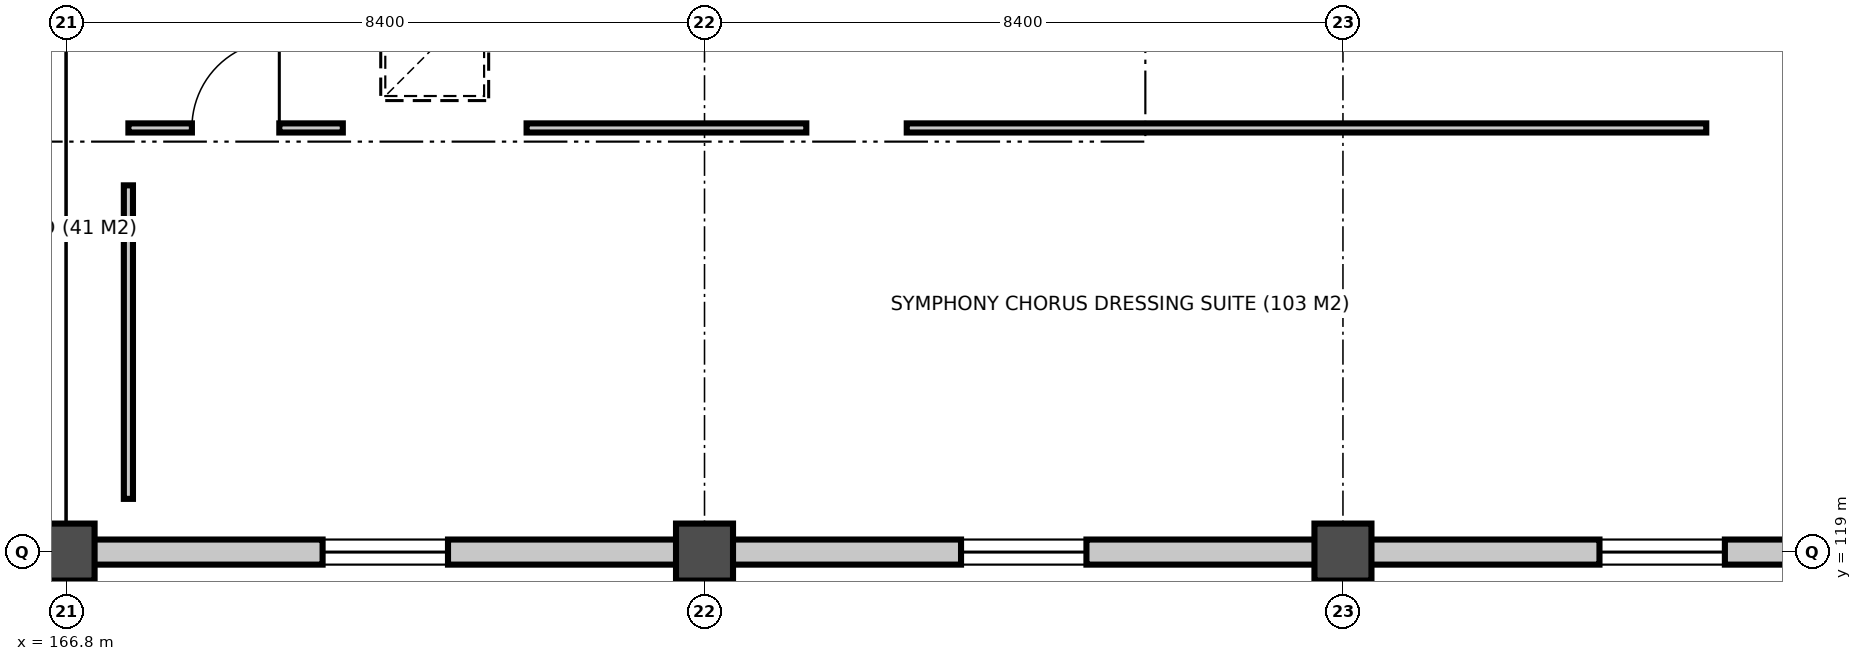
"""IFC4 building model, lengths in metres.
Left out: names, types, materials, properties, quantities, classifications, styles, units other than length and angle.
Written with IfcOpenShell. Run it as: python <this file> out.ifc"""

import sys

from ifc_helpers import new_model, si_unit, direction, frame, frame_2d, origin, origin_2d, place, context, subcontext, project, spatial, rectangle, extrude, element, fill, save


model = new_model("IFC4")
c1 = context("Model", 3, precision=1e-05, world=origin(), true_north=direction((0.0, 1.0)))
c2 = subcontext(c1, "Body", "Model", "MODEL_VIEW")
j1 = project(units=[si_unit("LENGTHUNIT", "METRE"), si_unit("PLANEANGLEUNIT", "RADIAN")], contexts=[c1])
p1 = place(None, origin())
s1 = spatial("IfcSite", under=j1, at=p1, CompositionType="ELEMENT")
p2 = place(p1, origin())
s2 = spatial("IfcBuilding", under=s1, at=p2, CompositionType="ELEMENT")
p3 = place(p2, frame((0.0, 0.0, 10.2)))
s3 = spatial("IfcBuildingStorey", under=s2, at=p3, CompositionType="ELEMENT", Elevation=10.2)
for number, where, z_axis, x_axis in (
    (1, (166.8, 119.0, 0.0), (0.0, 0.0, 1.0), (1.0, 0.0, 0.0)),
    (2, (175.2, 119.0, 0.0), (0.0, 0.0, 1.0), (1.0, 0.0, 0.0)),
    (3, (183.6, 119.0, 0.0), (0.0, 0.0, 1.0), (1.0, 0.0, 0.0)),
):
    element("IfcColumn", number, at=place(p3, frame(where, z_axis=z_axis, x_axis=x_axis)), inside=s3, PredefinedType="COLUMN", context=c2, shape_type="SweptSolid", body=[
        extrude(rectangle(XDim=0.75, YDim=0.75, at=origin_2d()), origin(), (0.0, 0.0, 1.0), 4.8),
    ])
p4 = place(p3, frame((174.845, 119.0, 0.0), z_axis=(0.0, 0.0, 1.0), x_axis=(-1.0, 0.0, 0.0)))
e4 = element("IfcWall", 4, at=p4, inside=s3, PredefinedType="SOLIDWALL", context=c2, shape_type="SweptSolid", body=[
    extrude(rectangle(XDim=7.69, YDim=0.33, at=frame_2d((3.845, 0.0))), origin(), (0.0, 0.0, 1.0), 3.624),
])
p5 = place(p4, frame((3.02, 0.0, 0.95)))
e5 = element("IfcOpeningElement", 5, at=p5, cuts=e4, PredefinedType="OPENING", context=c2, shape_type="SweptSolid", body=[
    extrude(rectangle(XDim=1.65, YDim=2.18, at=frame_2d((0.825, 1.09))), frame((0.0, 0.175, 0.0), z_axis=(0.0, -1.0, 0.0), x_axis=(1.0, 0.0, 0.0)), (0.0, 0.0, 1.0), 0.35),
])
p6 = place(p3, frame((183.245, 119.0, 0.0), z_axis=(0.0, 0.0, 1.0), x_axis=(-1.0, 0.0, 0.0)))
e6 = element("IfcWall", 6, at=p6, inside=s3, PredefinedType="SOLIDWALL", context=c2, shape_type="SweptSolid", body=[
    extrude(rectangle(XDim=7.69, YDim=0.33, at=frame_2d((3.845, 0.0))), origin(), (0.0, 0.0, 1.0), 3.916),
])
p7 = place(p6, frame((3.02, 0.0, 0.95)))
e7 = element("IfcOpeningElement", 7, at=p7, cuts=e6, PredefinedType="OPENING", context=c2, shape_type="SweptSolid", body=[
    extrude(rectangle(XDim=1.65, YDim=2.18, at=frame_2d((0.825, 1.09))), frame((0.0, 0.175, 0.0), z_axis=(0.0, -1.0, 0.0), x_axis=(1.0, 0.0, 0.0)), (0.0, 0.0, 1.0), 0.35),
])
p8 = place(p3, frame((191.645, 119.0, 0.0), z_axis=(0.0, 0.0, 1.0), x_axis=(-1.0, 0.0, 0.0)))
e8 = element("IfcWall", 8, at=p8, inside=s3, PredefinedType="SOLIDWALL", context=c2, shape_type="SweptSolid", body=[
    extrude(rectangle(XDim=7.69, YDim=0.33, at=frame_2d((3.845, 0.0))), origin(), (0.0, 0.0, 1.0), 3.774),
])
p9 = place(p8, frame((3.02, 0.0, 0.95)))
e9 = element("IfcOpeningElement", 9, at=p9, cuts=e8, PredefinedType="OPENING", context=c2, shape_type="SweptSolid", body=[
    extrude(rectangle(XDim=1.65, YDim=2.18, at=frame_2d((0.825, 1.09))), frame((0.0, 0.175, 0.0), z_axis=(0.0, -1.0, 0.0), x_axis=(1.0, 0.0, 0.0)), (0.0, 0.0, 1.0), 0.35),
])
p10 = place(p3, frame((167.62, 124.58, 0.0), z_axis=(0.0, 0.0, 1.0), x_axis=(1.0, 0.0, 0.0)))
e10 = element("IfcWall", 10, at=p10, inside=s3, PredefinedType="PARTITIONING", context=c2, shape_type="SweptSolid", body=[
    extrude(rectangle(XDim=2.821, YDim=0.12, at=frame_2d((1.41, 0.0))), origin(), (0.0, 0.0, 1.0), 3.46),
])
p11 = place(p10, frame((0.835, 0.0, 0.0)))
e11 = element("IfcOpeningElement", 11, at=p11, cuts=e10, PredefinedType="OPENING", context=c2, shape_type="SweptSolid", body=[
    extrude(rectangle(XDim=1.15, YDim=2.24, at=frame_2d((0.575, 1.12))), frame((0.0, 0.07, 0.0), z_axis=(0.0, -1.0, 0.0), x_axis=(1.0, 0.0, 0.0)), (0.0, 0.0, 1.0), 0.14),
])
p12 = place(p3, frame((172.859, 124.58, 0.0), z_axis=(0.0, 0.0, 1.0), x_axis=(1.0, 0.0, 0.0)))
e12 = element("IfcWall", 12, at=p12, inside=s3, PredefinedType="PARTITIONING", context=c2, shape_type="SweptSolid", body=[
    extrude(rectangle(XDim=3.68, YDim=0.12, at=frame_2d((1.84, 0.0))), origin(), (0.0, 0.0, 1.0), 3.46),
])
p13 = place(p3, frame((177.861, 124.58, 0.0), z_axis=(0.0, 0.0, 1.0), x_axis=(1.0, 0.0, 0.0)))
e13 = element("IfcWall", 13, at=p13, inside=s3, PredefinedType="PARTITIONING", context=c2, shape_type="SweptSolid", body=[
    extrude(rectangle(XDim=10.519, YDim=0.12, at=frame_2d((5.26, 0.0))), origin(), (0.0, 0.0, 1.0), 3.46),
])
p14 = place(p3, frame((167.62, 119.7, 0.0), z_axis=(0.0, 0.0, 1.0), x_axis=(0.0, 1.0, 0.0)))
e14 = element("IfcWall", 14, at=p14, inside=s3, PredefinedType="PARTITIONING", context=c2, shape_type="SweptSolid", body=[
    extrude(rectangle(XDim=4.125, YDim=0.12, at=frame_2d((2.062, 0.0))), origin(), (0.0, 0.0, 1.0), 3.46),
])
p15 = place(p5, origin())
e15 = element("IfcWindow", 15, at=p15, inside=s3, PartitioningType="SINGLE_PANEL", PredefinedType="WINDOW", context=c2, shape_type="SweptSolid", body=[
    extrude(rectangle(XDim=1.65, YDim=2.18, at=frame_2d((0.825, 1.09))), frame((0.0, 0.03, 0.0), z_axis=(0.0, -1.0, 0.0), x_axis=(1.0, 0.0, 0.0)), (0.0, 0.0, 1.0), 0.06),
])
fill(e5, e15)
p16 = place(p7, origin())
e16 = element("IfcWindow", 16, at=p16, inside=s3, PartitioningType="SINGLE_PANEL", PredefinedType="WINDOW", context=c2, shape_type="SweptSolid", body=[
    extrude(rectangle(XDim=1.65, YDim=2.18, at=frame_2d((0.825, 1.09))), frame((0.0, 0.03, 0.0), z_axis=(0.0, -1.0, 0.0), x_axis=(1.0, 0.0, 0.0)), (0.0, 0.0, 1.0), 0.06),
])
fill(e7, e16)
p17 = place(p9, origin())
e17 = element("IfcWindow", 17, at=p17, inside=s3, PartitioningType="SINGLE_PANEL", PredefinedType="WINDOW", context=c2, shape_type="SweptSolid", body=[
    extrude(rectangle(XDim=1.65, YDim=2.18, at=frame_2d((0.825, 1.09))), frame((0.0, 0.03, 0.0), z_axis=(0.0, -1.0, 0.0), x_axis=(1.0, 0.0, 0.0)), (0.0, 0.0, 1.0), 0.06),
])
fill(e9, e17)
p18 = place(p11, origin())
e18 = element("IfcDoor", 18, at=p18, inside=s3, OperationType="SINGLE_SWING_RIGHT", PredefinedType="DOOR", context=c2, shape_type="SweptSolid", body=[
    extrude(rectangle(XDim=1.15, YDim=2.24, at=frame_2d((0.575, 1.12))), frame((0.0, 0.025, 0.0), z_axis=(0.0, -1.0, 0.0), x_axis=(1.0, 0.0, 0.0)), (0.0, 0.0, 1.0), 0.05),
])
fill(e11, e18)
save(model, sys.argv[1])
